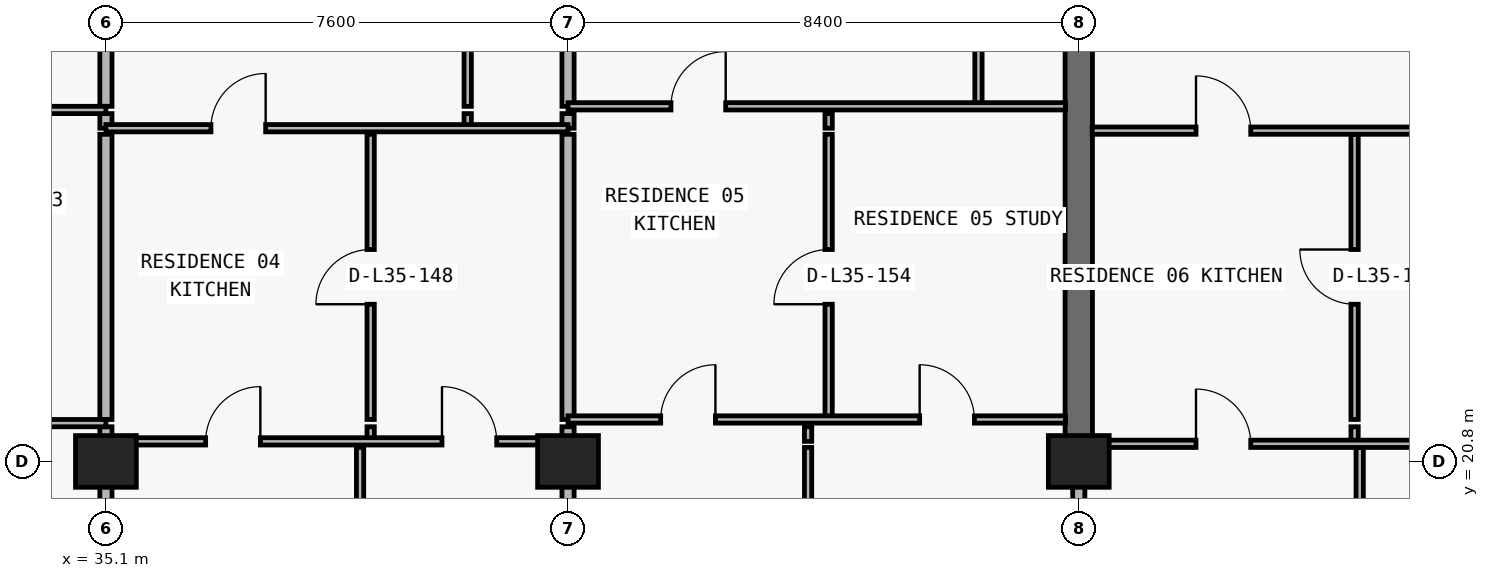
"""IFC4 building model, lengths in metres.
Left out: names, types, materials, properties, quantities, classifications, styles, units other than length and angle.
Written with IfcOpenShell. Run it as: python <this file> out.ifc"""

import sys

from ifc_helpers import new_model, si_unit, direction, frame, frame_2d, origin, origin_2d, place, context, subcontext, project, spatial, rectangle, extrude, element, fill, save


model = new_model("IFC4")
c1 = context("Model", 3, precision=1e-05, world=origin(), true_north=direction((0.0, 1.0)))
c2 = subcontext(c1, "Body", "Model", "MODEL_VIEW")
j1 = project(units=[si_unit("LENGTHUNIT", "METRE"), si_unit("PLANEANGLEUNIT", "RADIAN")], contexts=[c1])
p1 = place(None, origin())
s1 = spatial("IfcSite", under=j1, at=p1, CompositionType="ELEMENT")
p2 = place(p1, origin())
s2 = spatial("IfcBuilding", under=s1, at=p2, CompositionType="ELEMENT")
p3 = place(p2, frame((0.0, 0.0, 129.0)))
s3 = spatial("IfcBuildingStorey", under=s2, at=p3, CompositionType="ELEMENT", Elevation=129.0)
for number, where, z_axis, x_axis in (
    (1, (35.1, 20.8, 0.0), (0.0, 0.0, 1.0), (1.0, 0.0, 0.0)),
    (2, (42.7, 20.8, 0.0), (0.0, 0.0, 1.0), (1.0, 0.0, 0.0)),
    (3, (51.1, 20.8, 0.0), (0.0, 0.0, 1.0), (1.0, 0.0, 0.0)),
):
    element("IfcColumn", number, at=place(p3, frame(where, z_axis=z_axis, x_axis=x_axis)), inside=s3, PredefinedType="COLUMN", context=c2, shape_type="SweptSolid", body=[
        extrude(rectangle(XDim=1.0, YDim=0.85, at=origin_2d()), origin(), (0.0, 0.0, 1.0), 3.05),
    ])
p4 = place(p3, frame((51.1, 20.8, 0.0), z_axis=(0.0, 0.0, 1.0), x_axis=(0.0, 1.0, 0.0)))
e4 = element("IfcWall", 4, at=p4, inside=s3, PredefinedType="SHEAR", context=c2, shape_type="SweptSolid", body=[
    extrude(rectangle(XDim=8.6, YDim=0.45, at=frame_2d((4.3, 0.0))), origin(), (0.0, 0.0, 1.0), 3.05),
])
p5 = place(p3, frame((35.1, 8.84, 0.0), z_axis=(0.0, 0.0, 1.0), x_axis=(0.0, 1.0, 0.0)))
e5 = element("IfcWall", 5, at=p5, inside=s3, PredefinedType="PARTITIONING", context=c2, shape_type="SweptSolid", body=[
    extrude(rectangle(XDim=12.19, YDim=0.2, at=frame_2d((6.095, 0.0))), origin(), (0.0, 0.0, 1.0), 2.174),
])
p6 = place(p3, frame((35.1, 21.13, 0.0), z_axis=(0.0, 0.0, 1.0), x_axis=(0.0, 1.0, 0.0)))
e6 = element("IfcWall", 6, at=p6, inside=s3, PredefinedType="PARTITIONING", context=c2, shape_type="SweptSolid", body=[
    extrude(rectangle(XDim=0.24, YDim=0.2, at=frame_2d((0.12, 0.0))), origin(), (0.0, 0.0, 1.0), 2.174),
])
p7 = place(p3, frame((35.1, 21.49, 0.0), z_axis=(0.0, 0.0, 1.0), x_axis=(0.0, 1.0, 0.0)))
e7 = element("IfcWall", 7, at=p7, inside=s3, PredefinedType="PARTITIONING", context=c2, shape_type="SweptSolid", body=[
    extrude(rectangle(XDim=4.69, YDim=0.2, at=frame_2d((2.345, 0.0))), origin(), (0.0, 0.0, 1.0), 2.174),
])
p8 = place(p3, frame((35.1, 26.28, 0.0), z_axis=(0.0, 0.0, 1.0), x_axis=(0.0, 1.0, 0.0)))
e8 = element("IfcWall", 8, at=p8, inside=s3, PredefinedType="PARTITIONING", context=c2, shape_type="SweptSolid", body=[
    extrude(rectangle(XDim=0.24, YDim=0.2, at=frame_2d((0.12, 0.0))), origin(), (0.0, 0.0, 1.0), 2.174),
])
p9 = place(p3, frame((35.1, 26.64, 0.0), z_axis=(0.0, 0.0, 1.0), x_axis=(0.0, 1.0, 0.0)))
e9 = element("IfcWall", 9, at=p9, inside=s3, PredefinedType="PARTITIONING", context=c2, shape_type="SweptSolid", body=[
    extrude(rectangle(XDim=8.06, YDim=0.2, at=frame_2d((4.03, 0.0))), origin(), (0.0, 0.0, 1.0), 2.174),
])
p10 = place(p3, frame((39.28, 8.84, 0.0), z_axis=(0.0, 0.0, 1.0), x_axis=(0.0, 1.0, 0.0)))
e10 = element("IfcWall", 10, at=p10, inside=s3, PredefinedType="PARTITIONING", context=c2, shape_type="SweptSolid", body=[
    extrude(rectangle(XDim=12.19, YDim=0.12, at=frame_2d((6.095, 0.0))), origin(), (0.0, 0.0, 1.0), 3.05),
])
p11 = place(p3, frame((39.454, 21.13, 0.0), z_axis=(0.0, 0.0, 1.0), x_axis=(0.0, 1.0, 0.0)))
e11 = element("IfcWall", 11, at=p11, inside=s3, PredefinedType="PARTITIONING", context=c2, shape_type="SweptSolid", body=[
    extrude(rectangle(XDim=0.24, YDim=0.12, at=frame_2d((0.12, 0.0))), origin(), (0.0, 0.0, 1.0), 3.05),
])
p12 = place(p3, frame((39.454, 21.49, 0.0), z_axis=(0.0, 0.0, 1.0), x_axis=(0.0, 1.0, 0.0)))
e12 = element("IfcWall", 12, at=p12, inside=s3, PredefinedType="PARTITIONING", context=c2, shape_type="SweptSolid", body=[
    extrude(rectangle(XDim=4.69, YDim=0.12, at=frame_2d((2.345, 0.0))), origin(), (0.0, 0.0, 1.0), 3.05),
])
p13 = place(p12, frame((1.895, 0.0, 0.0)))
e13 = element("IfcOpeningElement", 13, at=p13, cuts=e12, PredefinedType="OPENING", context=c2, shape_type="SweptSolid", body=[
    extrude(rectangle(XDim=0.9, YDim=2.15, at=frame_2d((0.45, 1.075))), frame((0.0, 0.07, 0.0), z_axis=(0.0, -1.0, 0.0), x_axis=(1.0, 0.0, 0.0)), (0.0, 0.0, 1.0), 0.14),
])
p14 = place(p3, frame((41.05, 26.28, 0.0), z_axis=(0.0, 0.0, 1.0), x_axis=(0.0, 1.0, 0.0)))
e14 = element("IfcWall", 14, at=p14, inside=s3, PredefinedType="PARTITIONING", context=c2, shape_type="SweptSolid", body=[
    extrude(rectangle(XDim=0.24, YDim=0.12, at=frame_2d((0.12, 0.0))), origin(), (0.0, 0.0, 1.0), 3.05),
])
p15 = place(p3, frame((41.05, 26.64, 0.0), z_axis=(0.0, 0.0, 1.0), x_axis=(0.0, 1.0, 0.0)))
e15 = element("IfcWall", 15, at=p15, inside=s3, PredefinedType="PARTITIONING", context=c2, shape_type="SweptSolid", body=[
    extrude(rectangle(XDim=8.06, YDim=0.12, at=frame_2d((4.03, 0.0))), origin(), (0.0, 0.0, 1.0), 3.05),
])
p16 = place(p15, frame((3.755, 0.0, 0.0)))
e16 = element("IfcOpeningElement", 16, at=p16, cuts=e15, PredefinedType="OPENING", context=c2, shape_type="SweptSolid", body=[
    extrude(rectangle(XDim=0.85, YDim=2.1, at=frame_2d((0.425, 1.05))), frame((0.0, 0.07, 0.0), z_axis=(0.0, -1.0, 0.0), x_axis=(1.0, 0.0, 0.0)), (0.0, 0.0, 1.0), 0.14),
])
p17 = place(p3, frame((42.7, 8.84, 0.0), z_axis=(0.0, 0.0, 1.0), x_axis=(0.0, 1.0, 0.0)))
e17 = element("IfcWall", 17, at=p17, inside=s3, PredefinedType="PARTITIONING", context=c2, shape_type="SweptSolid", body=[
    extrude(rectangle(XDim=12.19, YDim=0.2, at=frame_2d((6.095, 0.0))), origin(), (0.0, 0.0, 1.0), 2.174),
])
p18 = place(p3, frame((42.7, 21.13, 0.0), z_axis=(0.0, 0.0, 1.0), x_axis=(0.0, 1.0, 0.0)))
e18 = element("IfcWall", 18, at=p18, inside=s3, PredefinedType="PARTITIONING", context=c2, shape_type="SweptSolid", body=[
    extrude(rectangle(XDim=0.24, YDim=0.2, at=frame_2d((0.12, 0.0))), origin(), (0.0, 0.0, 1.0), 2.174),
])
p19 = place(p3, frame((42.7, 21.49, 0.0), z_axis=(0.0, 0.0, 1.0), x_axis=(0.0, 1.0, 0.0)))
e19 = element("IfcWall", 19, at=p19, inside=s3, PredefinedType="PARTITIONING", context=c2, shape_type="SweptSolid", body=[
    extrude(rectangle(XDim=4.69, YDim=0.2, at=frame_2d((2.345, 0.0))), origin(), (0.0, 0.0, 1.0), 2.174),
])
p20 = place(p3, frame((42.7, 26.28, 0.0), z_axis=(0.0, 0.0, 1.0), x_axis=(0.0, 1.0, 0.0)))
e20 = element("IfcWall", 20, at=p20, inside=s3, PredefinedType="PARTITIONING", context=c2, shape_type="SweptSolid", body=[
    extrude(rectangle(XDim=0.24, YDim=0.2, at=frame_2d((0.12, 0.0))), origin(), (0.0, 0.0, 1.0), 2.174),
])
p21 = place(p3, frame((42.7, 26.64, 0.0), z_axis=(0.0, 0.0, 1.0), x_axis=(0.0, 1.0, 0.0)))
e21 = element("IfcWall", 21, at=p21, inside=s3, PredefinedType="PARTITIONING", context=c2, shape_type="SweptSolid", body=[
    extrude(rectangle(XDim=8.06, YDim=0.2, at=frame_2d((4.03, 0.0))), origin(), (0.0, 0.0, 1.0), 2.174),
])
p22 = place(p3, frame((46.648, 8.84, 0.0), z_axis=(0.0, 0.0, 1.0), x_axis=(0.0, 1.0, 0.0)))
e22 = element("IfcWall", 22, at=p22, inside=s3, PredefinedType="PARTITIONING", context=c2, shape_type="SweptSolid", body=[
    extrude(rectangle(XDim=12.19, YDim=0.12, at=frame_2d((6.095, 0.0))), origin(), (0.0, 0.0, 1.0), 3.05),
])
p23 = place(p3, frame((46.648, 21.13, 0.0), z_axis=(0.0, 0.0, 1.0), x_axis=(0.0, 1.0, 0.0)))
e23 = element("IfcWall", 23, at=p23, inside=s3, PredefinedType="PARTITIONING", context=c2, shape_type="SweptSolid", body=[
    extrude(rectangle(XDim=0.24, YDim=0.12, at=frame_2d((0.12, 0.0))), origin(), (0.0, 0.0, 1.0), 3.05),
])
p24 = place(p3, frame((46.986, 21.49, 0.0), z_axis=(0.0, 0.0, 1.0), x_axis=(0.0, 1.0, 0.0)))
e24 = element("IfcWall", 24, at=p24, inside=s3, PredefinedType="PARTITIONING", context=c2, shape_type="SweptSolid", body=[
    extrude(rectangle(XDim=4.69, YDim=0.12, at=frame_2d((2.345, 0.0))), origin(), (0.0, 0.0, 1.0), 3.05),
])
p25 = place(p24, frame((1.895, 0.0, 0.0)))
e25 = element("IfcOpeningElement", 25, at=p25, cuts=e24, PredefinedType="OPENING", context=c2, shape_type="SweptSolid", body=[
    extrude(rectangle(XDim=0.9, YDim=2.15, at=frame_2d((0.45, 1.075))), frame((0.0, 0.07, 0.0), z_axis=(0.0, -1.0, 0.0), x_axis=(1.0, 0.0, 0.0)), (0.0, 0.0, 1.0), 0.14),
])
p26 = place(p3, frame((46.986, 26.28, 0.0), z_axis=(0.0, 0.0, 1.0), x_axis=(0.0, 1.0, 0.0)))
e26 = element("IfcWall", 26, at=p26, inside=s3, PredefinedType="PARTITIONING", context=c2, shape_type="SweptSolid", body=[
    extrude(rectangle(XDim=0.24, YDim=0.12, at=frame_2d((0.12, 0.0))), origin(), (0.0, 0.0, 1.0), 3.05),
])
p27 = place(p3, frame((49.45, 26.64, 0.0), z_axis=(0.0, 0.0, 1.0), x_axis=(0.0, 1.0, 0.0)))
e27 = element("IfcWall", 27, at=p27, inside=s3, PredefinedType="PARTITIONING", context=c2, shape_type="SweptSolid", body=[
    extrude(rectangle(XDim=8.06, YDim=0.12, at=frame_2d((4.03, 0.0))), origin(), (0.0, 0.0, 1.0), 3.05),
])
p28 = place(p27, frame((3.755, 0.0, 0.0)))
e28 = element("IfcOpeningElement", 28, at=p28, cuts=e27, PredefinedType="OPENING", context=c2, shape_type="SweptSolid", body=[
    extrude(rectangle(XDim=0.85, YDim=2.1, at=frame_2d((0.425, 1.05))), frame((0.0, 0.07, 0.0), z_axis=(0.0, -1.0, 0.0), x_axis=(1.0, 0.0, 0.0)), (0.0, 0.0, 1.0), 0.14),
])
p29 = place(p3, frame((51.1, 8.84, 0.0), z_axis=(0.0, 0.0, 1.0), x_axis=(0.0, 1.0, 0.0)))
e29 = element("IfcWall", 29, at=p29, inside=s3, PredefinedType="PARTITIONING", context=c2, shape_type="SweptSolid", body=[
    extrude(rectangle(XDim=11.955, YDim=0.2, at=frame_2d((5.978, 0.0))), origin(), (0.0, 0.0, 1.0), 2.174),
])
p30 = place(p3, frame((55.636, 21.13, 0.0), z_axis=(0.0, 0.0, 1.0), x_axis=(0.0, 1.0, 0.0)))
e30 = element("IfcWall", 30, at=p30, inside=s3, PredefinedType="PARTITIONING", context=c2, shape_type="SweptSolid", body=[
    extrude(rectangle(XDim=0.24, YDim=0.12, at=frame_2d((0.12, 0.0))), origin(), (0.0, 0.0, 1.0), 3.05),
])
p31 = place(p3, frame((55.636, 21.49, 0.0), z_axis=(0.0, 0.0, 1.0), x_axis=(0.0, 1.0, 0.0)))
e31 = element("IfcWall", 31, at=p31, inside=s3, PredefinedType="PARTITIONING", context=c2, shape_type="SweptSolid", body=[
    extrude(rectangle(XDim=4.69, YDim=0.12, at=frame_2d((2.345, 0.0))), origin(), (0.0, 0.0, 1.0), 3.05),
])
p32 = place(p31, frame((1.895, 0.0, 0.0)))
e32 = element("IfcOpeningElement", 32, at=p32, cuts=e31, PredefinedType="OPENING", context=c2, shape_type="SweptSolid", body=[
    extrude(rectangle(XDim=0.9, YDim=2.15, at=frame_2d((0.45, 1.075))), frame((0.0, 0.07, 0.0), z_axis=(0.0, -1.0, 0.0), x_axis=(1.0, 0.0, 0.0)), (0.0, 0.0, 1.0), 0.14),
])
p33 = place(p3, frame((55.72, 8.84, 0.0), z_axis=(0.0, 0.0, 1.0), x_axis=(0.0, 1.0, 0.0)))
e33 = element("IfcWall", 33, at=p33, inside=s3, PredefinedType="PARTITIONING", context=c2, shape_type="SweptSolid", body=[
    extrude(rectangle(XDim=12.19, YDim=0.12, at=frame_2d((6.095, 0.0))), origin(), (0.0, 0.0, 1.0), 3.05),
])
p34 = place(p3, frame((51.32, 21.09, 0.0), z_axis=(0.0, 0.0, 1.0), x_axis=(1.0, 0.0, 0.0)))
e34 = element("IfcWall", 34, at=p34, inside=s3, PredefinedType="PARTITIONING", context=c2, shape_type="SweptSolid", body=[
    extrude(rectangle(XDim=8.18, YDim=0.12, at=frame_2d((4.09, 0.0))), origin(), (0.0, 0.0, 1.0), 2.174),
])
p35 = place(p34, frame((1.708, 0.0, 0.0)))
e35 = element("IfcOpeningElement", 35, at=p35, cuts=e34, PredefinedType="OPENING", context=c2, shape_type="SweptSolid", body=[
    extrude(rectangle(XDim=0.9, YDim=2.124, at=frame_2d((0.45, 1.062))), frame((0.0, 0.07, 0.0), z_axis=(0.0, -1.0, 0.0), x_axis=(1.0, 0.0, 0.0)), (0.0, 0.0, 1.0), 0.14),
])
p36 = place(p34, frame((5.84, 0.0, 0.0)))
e36 = element("IfcOpeningElement", 36, at=p36, cuts=e34, PredefinedType="OPENING", context=c2, shape_type="SweptSolid", body=[
    extrude(rectangle(XDim=0.9, YDim=2.124, at=frame_2d((0.45, 1.062))), frame((0.0, 0.07, 0.0), z_axis=(0.0, -1.0, 0.0), x_axis=(1.0, 0.0, 0.0)), (0.0, 0.0, 1.0), 0.14),
])
p37 = place(p3, frame((35.1, 21.13, 0.0), z_axis=(0.0, 0.0, 1.0), x_axis=(1.0, 0.0, 0.0)))
e37 = element("IfcWall", 37, at=p37, inside=s3, PredefinedType="PARTITIONING", context=c2, shape_type="SweptSolid", body=[
    extrude(rectangle(XDim=7.6, YDim=0.12, at=frame_2d((3.8, 0.0))), origin(), (0.0, 0.0, 1.0), 2.174),
])
p38 = place(p37, frame((1.64, 0.0, 0.0)))
e38 = element("IfcOpeningElement", 38, at=p38, cuts=e37, PredefinedType="OPENING", context=c2, shape_type="SweptSolid", body=[
    extrude(rectangle(XDim=0.9, YDim=2.124, at=frame_2d((0.45, 1.062))), frame((0.0, 0.07, 0.0), z_axis=(0.0, -1.0, 0.0), x_axis=(1.0, 0.0, 0.0)), (0.0, 0.0, 1.0), 0.14),
])
p39 = place(p37, frame((5.527, 0.0, 0.0)))
e39 = element("IfcOpeningElement", 39, at=p39, cuts=e37, PredefinedType="OPENING", context=c2, shape_type="SweptSolid", body=[
    extrude(rectangle(XDim=0.9, YDim=2.124, at=frame_2d((0.45, 1.062))), frame((0.0, 0.07, 0.0), z_axis=(0.0, -1.0, 0.0), x_axis=(1.0, 0.0, 0.0)), (0.0, 0.0, 1.0), 0.14),
])
p40 = place(p3, frame((26.92, 21.43, 0.0), z_axis=(0.0, 0.0, 1.0), x_axis=(1.0, 0.0, 0.0)))
e40 = element("IfcWall", 40, at=p40, inside=s3, PredefinedType="PARTITIONING", context=c2, shape_type="SweptSolid", body=[
    extrude(rectangle(XDim=8.18, YDim=0.12, at=frame_2d((4.09, 0.0))), origin(), (0.0, 0.0, 1.0), 3.05),
])
p41 = place(p40, frame((1.414, 0.0, 0.0)))
e41 = element("IfcOpeningElement", 41, at=p41, cuts=e40, PredefinedType="OPENING", context=c2, shape_type="SweptSolid", body=[
    extrude(rectangle(XDim=0.9, YDim=2.15, at=frame_2d((0.45, 1.075))), frame((0.0, 0.07, 0.0), z_axis=(0.0, -1.0, 0.0), x_axis=(1.0, 0.0, 0.0)), (0.0, 0.0, 1.0), 0.14),
])
p42 = place(p40, frame((5.798, 0.0, 0.0)))
e42 = element("IfcOpeningElement", 42, at=p42, cuts=e40, PredefinedType="OPENING", context=c2, shape_type="SweptSolid", body=[
    extrude(rectangle(XDim=0.9, YDim=2.15, at=frame_2d((0.45, 1.075))), frame((0.0, 0.07, 0.0), z_axis=(0.0, -1.0, 0.0), x_axis=(1.0, 0.0, 0.0)), (0.0, 0.0, 1.0), 0.14),
])
p43 = place(p3, frame((42.7, 21.49, 0.0), z_axis=(0.0, 0.0, 1.0), x_axis=(1.0, 0.0, 0.0)))
e43 = element("IfcWall", 43, at=p43, inside=s3, PredefinedType="PARTITIONING", context=c2, shape_type="SweptSolid", body=[
    extrude(rectangle(XDim=8.18, YDim=0.12, at=frame_2d((4.09, 0.0))), origin(), (0.0, 0.0, 1.0), 3.05),
])
p44 = place(p43, frame((1.524, 0.0, 0.0)))
e44 = element("IfcOpeningElement", 44, at=p44, cuts=e43, PredefinedType="OPENING", context=c2, shape_type="SweptSolid", body=[
    extrude(rectangle(XDim=0.9, YDim=2.15, at=frame_2d((0.45, 1.075))), frame((0.0, 0.07, 0.0), z_axis=(0.0, -1.0, 0.0), x_axis=(1.0, 0.0, 0.0)), (0.0, 0.0, 1.0), 0.14),
])
p45 = place(p43, frame((5.783, 0.0, 0.0)))
e45 = element("IfcOpeningElement", 45, at=p45, cuts=e43, PredefinedType="OPENING", context=c2, shape_type="SweptSolid", body=[
    extrude(rectangle(XDim=0.9, YDim=2.15, at=frame_2d((0.45, 1.075))), frame((0.0, 0.07, 0.0), z_axis=(0.0, -1.0, 0.0), x_axis=(1.0, 0.0, 0.0)), (0.0, 0.0, 1.0), 0.14),
])
p46 = place(p3, frame((51.32, 26.24, 0.0), z_axis=(0.0, 0.0, 1.0), x_axis=(1.0, 0.0, 0.0)))
e46 = element("IfcWall", 46, at=p46, inside=s3, PredefinedType="PARTITIONING", context=c2, shape_type="SweptSolid", body=[
    extrude(rectangle(XDim=8.18, YDim=0.12, at=frame_2d((4.09, 0.0))), origin(), (0.0, 0.0, 1.0), 3.05),
])
p47 = place(p46, frame((1.708, 0.0, 0.0)))
e47 = element("IfcOpeningElement", 47, at=p47, cuts=e46, PredefinedType="OPENING", context=c2, shape_type="SweptSolid", body=[
    extrude(rectangle(XDim=0.9, YDim=2.15, at=frame_2d((0.45, 1.075))), frame((0.0, 0.07, 0.0), z_axis=(0.0, -1.0, 0.0), x_axis=(1.0, 0.0, 0.0)), (0.0, 0.0, 1.0), 0.14),
])
p48 = place(p3, frame((35.1, 26.28, 0.0), z_axis=(0.0, 0.0, 1.0), x_axis=(1.0, 0.0, 0.0)))
e48 = element("IfcWall", 48, at=p48, inside=s3, PredefinedType="PARTITIONING", context=c2, shape_type="SweptSolid", body=[
    extrude(rectangle(XDim=7.6, YDim=0.12, at=frame_2d((3.8, 0.0))), origin(), (0.0, 0.0, 1.0), 3.05),
])
p49 = place(p48, frame((1.727, 0.0, 0.0)))
e49 = element("IfcOpeningElement", 49, at=p49, cuts=e48, PredefinedType="OPENING", context=c2, shape_type="SweptSolid", body=[
    extrude(rectangle(XDim=0.9, YDim=2.15, at=frame_2d((0.45, 1.075))), frame((0.0, 0.07, 0.0), z_axis=(0.0, -1.0, 0.0), x_axis=(1.0, 0.0, 0.0)), (0.0, 0.0, 1.0), 0.14),
])
p50 = place(p3, frame((26.92, 26.58, 0.0), z_axis=(0.0, 0.0, 1.0), x_axis=(1.0, 0.0, 0.0)))
e50 = element("IfcWall", 50, at=p50, inside=s3, PredefinedType="PARTITIONING", context=c2, shape_type="SweptSolid", body=[
    extrude(rectangle(XDim=8.18, YDim=0.12, at=frame_2d((4.09, 0.0))), origin(), (0.0, 0.0, 1.0), 3.05),
])
p51 = place(p50, frame((1.708, 0.0, 0.0)))
e51 = element("IfcOpeningElement", 51, at=p51, cuts=e50, PredefinedType="OPENING", context=c2, shape_type="SweptSolid", body=[
    extrude(rectangle(XDim=0.9, YDim=2.15, at=frame_2d((0.45, 1.075))), frame((0.0, 0.07, 0.0), z_axis=(0.0, -1.0, 0.0), x_axis=(1.0, 0.0, 0.0)), (0.0, 0.0, 1.0), 0.14),
])
p52 = place(p3, frame((42.7, 26.64, 0.0), z_axis=(0.0, 0.0, 1.0), x_axis=(1.0, 0.0, 0.0)))
e52 = element("IfcWall", 52, at=p52, inside=s3, PredefinedType="PARTITIONING", context=c2, shape_type="SweptSolid", body=[
    extrude(rectangle(XDim=8.18, YDim=0.12, at=frame_2d((4.09, 0.0))), origin(), (0.0, 0.0, 1.0), 3.05),
])
p53 = place(p52, frame((1.693, 0.0, 0.0)))
e53 = element("IfcOpeningElement", 53, at=p53, cuts=e52, PredefinedType="OPENING", context=c2, shape_type="SweptSolid", body=[
    extrude(rectangle(XDim=0.9, YDim=2.15, at=frame_2d((0.45, 1.075))), frame((0.0, 0.07, 0.0), z_axis=(0.0, -1.0, 0.0), x_axis=(1.0, 0.0, 0.0)), (0.0, 0.0, 1.0), 0.14),
])
p54 = place(p49, origin())
e54 = element("IfcDoor", 54, at=p54, inside=s3, OperationType="SINGLE_SWING_RIGHT", PredefinedType="DOOR", context=c2, shape_type="SweptSolid", body=[
    extrude(rectangle(XDim=0.9, YDim=2.15, at=frame_2d((0.45, 1.075))), frame((0.0, 0.025, 0.0), z_axis=(0.0, -1.0, 0.0), x_axis=(1.0, 0.0, 0.0)), (0.0, 0.0, 1.0), 0.05),
])
fill(e49, e54)
p55 = place(p13, origin())
e55 = element("IfcDoor", 55, at=p55, inside=s3, OperationType="SINGLE_SWING_LEFT", PredefinedType="DOOR", context=c2, shape_type="SweptSolid", body=[
    extrude(rectangle(XDim=0.9, YDim=2.15, at=frame_2d((0.45, 1.075))), frame((0.0, 0.025, 0.0), z_axis=(0.0, -1.0, 0.0), x_axis=(1.0, 0.0, 0.0)), (0.0, 0.0, 1.0), 0.05),
])
fill(e13, e55)
p56 = place(p38, origin())
e56 = element("IfcDoor", 56, at=p56, inside=s3, OperationType="SINGLE_SWING_RIGHT", PredefinedType="DOOR", context=c2, shape_type="SweptSolid", body=[
    extrude(rectangle(XDim=0.9, YDim=2.124, at=frame_2d((0.45, 1.062))), frame((0.0, 0.025, 0.0), z_axis=(0.0, -1.0, 0.0), x_axis=(1.0, 0.0, 0.0)), (0.0, 0.0, 1.0), 0.05),
])
fill(e38, e56)
p57 = place(p39, origin())
e57 = element("IfcDoor", 57, at=p57, inside=s3, OperationType="SINGLE_SWING_LEFT", PredefinedType="DOOR", context=c2, shape_type="SweptSolid", body=[
    extrude(rectangle(XDim=0.9, YDim=2.124, at=frame_2d((0.45, 1.062))), frame((0.0, 0.025, 0.0), z_axis=(0.0, -1.0, 0.0), x_axis=(1.0, 0.0, 0.0)), (0.0, 0.0, 1.0), 0.05),
])
fill(e39, e57)
p58 = place(p53, origin())
e58 = element("IfcDoor", 58, at=p58, inside=s3, OperationType="SINGLE_SWING_RIGHT", PredefinedType="DOOR", context=c2, shape_type="SweptSolid", body=[
    extrude(rectangle(XDim=0.9, YDim=2.15, at=frame_2d((0.45, 1.075))), frame((0.0, 0.025, 0.0), z_axis=(0.0, -1.0, 0.0), x_axis=(1.0, 0.0, 0.0)), (0.0, 0.0, 1.0), 0.05),
])
fill(e53, e58)
p59 = place(p25, origin())
e59 = element("IfcDoor", 59, at=p59, inside=s3, OperationType="SINGLE_SWING_LEFT", PredefinedType="DOOR", context=c2, shape_type="SweptSolid", body=[
    extrude(rectangle(XDim=0.9, YDim=2.15, at=frame_2d((0.45, 1.075))), frame((0.0, 0.025, 0.0), z_axis=(0.0, -1.0, 0.0), x_axis=(1.0, 0.0, 0.0)), (0.0, 0.0, 1.0), 0.05),
])
fill(e25, e59)
p60 = place(p44, origin())
e60 = element("IfcDoor", 60, at=p60, inside=s3, OperationType="SINGLE_SWING_RIGHT", PredefinedType="DOOR", context=c2, shape_type="SweptSolid", body=[
    extrude(rectangle(XDim=0.9, YDim=2.15, at=frame_2d((0.45, 1.075))), frame((0.0, 0.025, 0.0), z_axis=(0.0, -1.0, 0.0), x_axis=(1.0, 0.0, 0.0)), (0.0, 0.0, 1.0), 0.05),
])
fill(e44, e60)
p61 = place(p45, origin())
e61 = element("IfcDoor", 61, at=p61, inside=s3, OperationType="SINGLE_SWING_LEFT", PredefinedType="DOOR", context=c2, shape_type="SweptSolid", body=[
    extrude(rectangle(XDim=0.9, YDim=2.15, at=frame_2d((0.45, 1.075))), frame((0.0, 0.025, 0.0), z_axis=(0.0, -1.0, 0.0), x_axis=(1.0, 0.0, 0.0)), (0.0, 0.0, 1.0), 0.05),
])
fill(e45, e61)
p62 = place(p47, origin())
e62 = element("IfcDoor", 62, at=p62, inside=s3, OperationType="SINGLE_SWING_LEFT", PredefinedType="DOOR", context=c2, shape_type="SweptSolid", body=[
    extrude(rectangle(XDim=0.9, YDim=2.15, at=frame_2d((0.45, 1.075))), frame((0.0, 0.025, 0.0), z_axis=(0.0, -1.0, 0.0), x_axis=(1.0, 0.0, 0.0)), (0.0, 0.0, 1.0), 0.05),
])
fill(e47, e62)
p63 = place(p32, origin())
e63 = element("IfcDoor", 63, at=p63, inside=s3, OperationType="SINGLE_SWING_RIGHT", PredefinedType="DOOR", context=c2, shape_type="SweptSolid", body=[
    extrude(rectangle(XDim=0.9, YDim=2.15, at=frame_2d((0.45, 1.075))), frame((0.0, 0.025, 0.0), z_axis=(0.0, -1.0, 0.0), x_axis=(1.0, 0.0, 0.0)), (0.0, 0.0, 1.0), 0.05),
])
fill(e32, e63)
p64 = place(p35, origin())
e64 = element("IfcDoor", 64, at=p64, inside=s3, OperationType="SINGLE_SWING_LEFT", PredefinedType="DOOR", context=c2, shape_type="SweptSolid", body=[
    extrude(rectangle(XDim=0.9, YDim=2.124, at=frame_2d((0.45, 1.062))), frame((0.0, 0.025, 0.0), z_axis=(0.0, -1.0, 0.0), x_axis=(1.0, 0.0, 0.0)), (0.0, 0.0, 1.0), 0.05),
])
fill(e35, e64)
save(model, sys.argv[1])
